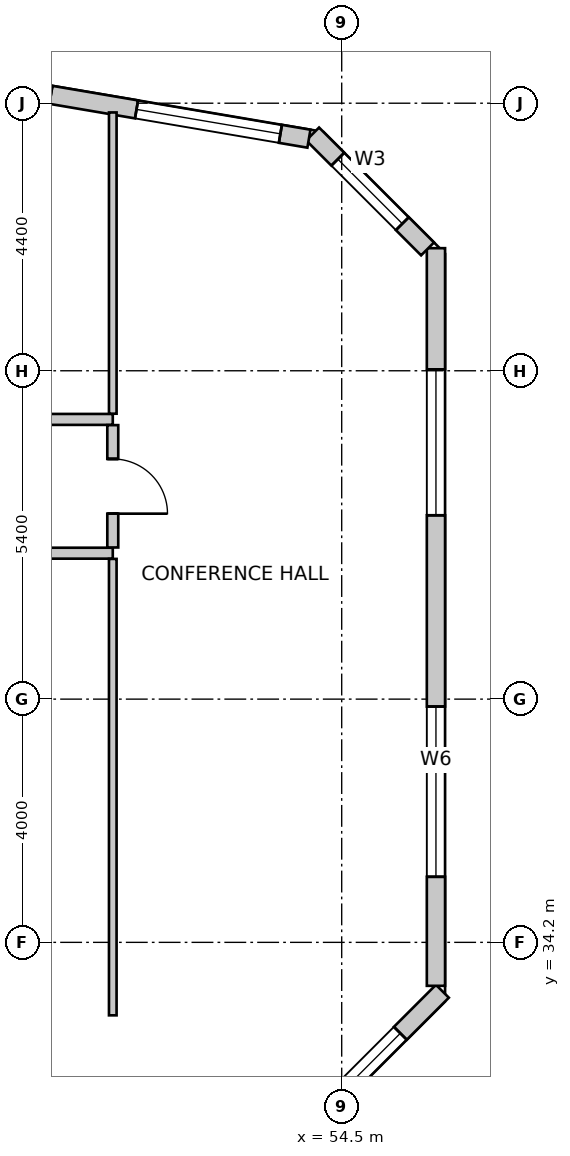
"""IFC4 building model, lengths in metres.
Left out: names, types, materials, properties, quantities, classifications, styles, units other than length and angle.
Written with IfcOpenShell. Run it as: python <this file> out.ifc"""

import sys

from ifc_helpers import new_model, si_unit, direction, frame, frame_2d, origin, place, context, subcontext, project, spatial, rectangle, extrude, source, transform, mapped, element, fill, save


model = new_model("IFC4")
c1 = context("Model", 3, precision=1e-05, world=origin(), true_north=direction((0.0, 1.0)))
c2 = subcontext(c1, "Body", "Model", "MODEL_VIEW")
j1 = project(units=[si_unit("LENGTHUNIT", "METRE"), si_unit("PLANEANGLEUNIT", "RADIAN")], contexts=[c1])
p1 = place(None, origin())
s1 = spatial("IfcSite", under=j1, at=p1, CompositionType="ELEMENT")
p2 = place(p1, origin())
s2 = spatial("IfcBuilding", under=s1, at=p2, CompositionType="ELEMENT")
p3 = place(p2, frame((0.0, 0.0, 67.0)))
s3 = spatial("IfcBuildingStorey", under=s2, at=p3, CompositionType="ELEMENT", Elevation=67.0)
p4 = place(p3, frame((53.076, 30.316, 0.0), z_axis=(0.0, 0.0, 1.0), x_axis=(0.707078757535, 0.707134803727, 0.0)))
e1 = element("IfcWall", 1, at=p4, inside=s3, PredefinedType="SOLIDWALL", context=c2, shape_type="SweptSolid", body=[
    extrude(rectangle(XDim=4.356, YDim=0.3, at=frame_2d((2.178, 0.0))), origin(), (0.0, 0.0, 1.0), 3.75),
])
m1 = source(origin(), c2, "Body", "SweptSolid", [
    extrude(rectangle(XDim=2.4, YDim=2.2, at=frame_2d((1.2, 1.1))), frame((0.0, 0.16, 0.0), z_axis=(0.0, -1.0, 0.0), x_axis=(1.0, 0.0, 0.0)), (0.0, 0.0, 1.0), 0.32),
])
p5 = place(p4, frame((0.978, 0.0, 0.85)))
e2 = element("IfcOpeningElement", 2, at=p5, cuts=e1, PredefinedType="OPENING", context=c2, shape_type="MappedRepresentation", body=[
    mapped(m1, transform((0.0, 0.0, 0.0), scale=1.0)),
])
p6 = place(p3, frame((56.05, 33.485, 0.0), z_axis=(0.0, 0.0, 1.0), x_axis=(0.0, 1.0, 0.0)))
e3 = element("IfcWall", 3, at=p6, inside=s3, PredefinedType="SOLIDWALL", context=c2, shape_type="SweptSolid", body=[
    extrude(rectangle(XDim=12.131, YDim=0.3, at=frame_2d((6.065, 0.0))), origin(), (0.0, 0.0, 1.0), 3.75),
])
m2 = source(origin(), c2, "Body", "SweptSolid", [
    extrude(rectangle(XDim=2.8, YDim=2.4, at=frame_2d((1.4, 1.2))), frame((0.0, 0.16, 0.0), z_axis=(0.0, -1.0, 0.0), x_axis=(1.0, 0.0, 0.0)), (0.0, 0.0, 1.0), 0.32),
])
p7 = place(p6, frame((1.793, 0.0, 0.85)))
e4 = element("IfcOpeningElement", 4, at=p7, cuts=e3, PredefinedType="OPENING", context=c2, shape_type="MappedRepresentation", body=[
    mapped(m2, transform((0.0, 0.0, 0.0), scale=1.0)),
])
p8 = place(p6, frame((7.738, 0.0, 0.85)))
e5 = element("IfcOpeningElement", 5, at=p8, cuts=e3, PredefinedType="OPENING", context=c2, shape_type="MappedRepresentation", body=[
    mapped(m1, transform((0.0, 0.0, 0.0), scale=1.0)),
])
p9 = place(p3, frame((55.912, 45.604, 0.0), z_axis=(0.0, 0.0, 1.0), x_axis=(-0.707152443695, 0.707061115729, 0.0)))
e6 = element("IfcWall", 6, at=p9, inside=s3, PredefinedType="SOLIDWALL", context=c2, shape_type="SweptSolid", body=[
    extrude(rectangle(XDim=2.673, YDim=0.3, at=frame_2d((1.337, 0.0))), origin(), (0.0, 0.0, 1.0), 3.75),
])
m3 = source(origin(), c2, "Body", "SweptSolid", [
    extrude(rectangle(XDim=1.5, YDim=1.8, at=frame_2d((0.75, 0.9))), frame((0.0, 0.16, 0.0), z_axis=(0.0, -1.0, 0.0), x_axis=(1.0, 0.0, 0.0)), (0.0, 0.0, 1.0), 0.32),
])
p10 = place(p9, frame((0.587, 0.0, 0.85)))
e7 = element("IfcOpeningElement", 7, at=p10, cuts=e6, PredefinedType="OPENING", context=c2, shape_type="MappedRepresentation", body=[
    mapped(m3, transform((0.0, 0.0, 0.0), scale=1.0)),
])
p11 = place(p3, frame((53.961, 47.417, 0.0), z_axis=(0.0, 0.0, 1.0), x_axis=(-0.985865713455, 0.167537443678, 0.0)))
e8 = element("IfcWall", 8, at=p11, inside=s3, PredefinedType="SOLIDWALL", context=c2, shape_type="SweptSolid", body=[
    extrude(rectangle(XDim=32.537, YDim=0.3, at=frame_2d((16.269, 0.0))), origin(), (0.0, 0.0, 1.0), 3.75),
])
p12 = place(p11, frame((0.476, 0.0, 0.85)))
e9 = element("IfcOpeningElement", 9, at=p12, cuts=e8, PredefinedType="OPENING", context=c2, shape_type="MappedRepresentation", body=[
    mapped(m1, transform((0.0, 0.0, 0.0), scale=1.0)),
])
p13 = place(p11, frame((4.304, 0.0, 0.85)))
e10 = element("IfcOpeningElement", 10, at=p13, cuts=e8, PredefinedType="OPENING", context=c2, shape_type="MappedRepresentation", body=[
    mapped(m2, transform((0.0, 0.0, 0.0), scale=1.0)),
])
p14 = place(p11, frame((8.968, 0.0, 0.85)))
e11 = element("IfcOpeningElement", 11, at=p14, cuts=e8, PredefinedType="OPENING", context=c2, shape_type="MappedRepresentation", body=[
    mapped(m1, transform((0.0, 0.0, 0.0), scale=1.0)),
])
p15 = place(p11, frame((14.034, 0.0, 0.85)))
e12 = element("IfcOpeningElement", 12, at=p15, cuts=e8, PredefinedType="OPENING", context=c2, shape_type="MappedRepresentation", body=[
    mapped(m2, transform((0.0, 0.0, 0.0), scale=1.0)),
])
p16 = place(p11, frame((19.422, 0.0, 0.85)))
e13 = element("IfcOpeningElement", 13, at=p16, cuts=e8, PredefinedType="OPENING", context=c2, shape_type="MappedRepresentation", body=[
    mapped(m1, transform((0.0, 0.0, 0.0), scale=1.0)),
])
p17 = place(p11, frame((24.895, 0.0, 0.85)))
e14 = element("IfcOpeningElement", 14, at=p17, cuts=e8, PredefinedType="OPENING", context=c2, shape_type="MappedRepresentation", body=[
    mapped(m2, transform((0.0, 0.0, 0.0), scale=1.0)),
])
p18 = place(p11, frame((29.395, 0.0, 0.85)))
e15 = element("IfcOpeningElement", 15, at=p18, cuts=e8, PredefinedType="OPENING", context=c2, shape_type="MappedRepresentation", body=[
    mapped(m2, transform((0.0, 0.0, 0.0), scale=1.0)),
])
p19 = place(p3, frame((50.735, 40.6, 0.0), z_axis=(0.0, 0.0, 1.0), x_axis=(-1.0, 0.0, 0.0)))
e16 = element("IfcWall", 16, at=p19, inside=s3, PredefinedType="PARTITIONING", context=c2, shape_type="SweptSolid", body=[
    extrude(rectangle(XDim=5.483, YDim=0.18, at=frame_2d((2.742, 0.0))), origin(), (0.0, 0.0, 1.0), 3.125),
])
m4 = source(origin(), c2, "Body", "SweptSolid", [
    extrude(rectangle(XDim=0.9, YDim=2.15, at=frame_2d((0.45, 1.075))), frame((0.0, 0.1, 0.0), z_axis=(0.0, -1.0, 0.0), x_axis=(1.0, 0.0, 0.0)), (0.0, 0.0, 1.0), 0.2),
])
p20 = place(p19, frame((4.181, 0.0, 0.0)))
e17 = element("IfcOpeningElement", 17, at=p20, cuts=e16, PredefinedType="OPENING", context=c2, shape_type="MappedRepresentation", body=[
    mapped(m4, transform((0.0, 0.0, 0.0), scale=1.0)),
])
p21 = place(p3, frame((41.662, 42.8, 0.0), z_axis=(0.0, 0.0, 1.0), x_axis=(1.0, 0.0, 0.0)))
e18 = element("IfcWall", 18, at=p21, inside=s3, PredefinedType="PARTITIONING", context=c2, shape_type="SweptSolid", body=[
    extrude(rectangle(XDim=9.073, YDim=0.18, at=frame_2d((4.537, 0.0))), origin(), (0.0, 0.0, 1.0), 3.125),
])
p22 = place(p21, frame((4.026, 0.0, 0.0)))
e19 = element("IfcOpeningElement", 19, at=p22, cuts=e18, PredefinedType="OPENING", context=c2, shape_type="MappedRepresentation", body=[
    mapped(m4, transform((0.0, 0.0, 0.0), scale=1.0)),
])
p23 = place(p3, frame((50.735, 42.706, 0.0), z_axis=(0.0, 0.0, 1.0), x_axis=(0.0, -1.0, 0.0)))
e20 = element("IfcWall", 20, at=p23, inside=s3, PredefinedType="PARTITIONING", context=c2, shape_type="SweptSolid", body=[
    extrude(rectangle(XDim=2.012, YDim=0.18, at=frame_2d((1.006, 0.0))), origin(), (0.0, 0.0, 1.0), 3.75),
])
p24 = place(p23, frame((0.556, 0.0, 0.0)))
e21 = element("IfcOpeningElement", 21, at=p24, cuts=e20, PredefinedType="OPENING", context=c2, shape_type="MappedRepresentation", body=[
    mapped(m4, transform((0.0, 0.0, 0.0), scale=1.0)),
])
p25 = place(p3, frame((50.735, 40.506, 0.0), z_axis=(0.0, 0.0, 1.0), x_axis=(0.0, -1.0, 0.0)))
e22 = element("IfcWall", 22, at=p25, inside=s3, PredefinedType="PARTITIONING", context=c2, shape_type="SweptSolid", body=[
    extrude(rectangle(XDim=7.506, YDim=0.125, at=frame_2d((3.753, 0.0))), origin(), (0.0, 0.0, 1.0), 3.75),
])
p26 = place(p3, frame((50.735, 47.848, 0.0), z_axis=(0.0, 0.0, 1.0), x_axis=(0.0, -1.0, 0.0)))
e23 = element("IfcWall", 23, at=p26, inside=s3, PredefinedType="PARTITIONING", context=c2, shape_type="SweptSolid", body=[
    extrude(rectangle(XDim=4.954, YDim=0.125, at=frame_2d((2.477, 0.0))), origin(), (0.0, 0.0, 1.0), 3.75),
])
m5 = source(origin(), c2, "Body", "SweptSolid", [
    extrude(rectangle(XDim=2.4, YDim=2.2, at=frame_2d((1.2, 1.1))), frame((0.0, -0.015, 0.0), z_axis=(0.0, -1.0, 0.0), x_axis=(1.0, 0.0, 0.0)), (0.0, 0.0, 1.0), 0.06),
])
p27 = place(p5, origin())
e24 = element("IfcWindow", 24, at=p27, inside=s3, PartitioningType="SINGLE_PANEL", PredefinedType="WINDOW", context=c2, shape_type="MappedRepresentation", body=[
    mapped(m5, transform((0.0, 0.0, 0.0), scale=1.0)),
])
fill(e2, e24)
m6 = source(origin(), c2, "Body", "SweptSolid", [
    extrude(rectangle(XDim=2.8, YDim=2.4, at=frame_2d((1.4, 1.2))), frame((0.0, -0.015, 0.0), z_axis=(0.0, -1.0, 0.0), x_axis=(1.0, 0.0, 0.0)), (0.0, 0.0, 1.0), 0.06),
])
p28 = place(p7, origin())
e25 = element("IfcWindow", 25, at=p28, inside=s3, PartitioningType="SINGLE_PANEL", PredefinedType="WINDOW", context=c2, shape_type="MappedRepresentation", body=[
    mapped(m6, transform((0.0, 0.0, 0.0), scale=1.0)),
])
fill(e4, e25)
p29 = place(p8, origin())
e26 = element("IfcWindow", 26, at=p29, inside=s3, PartitioningType="SINGLE_PANEL", PredefinedType="WINDOW", context=c2, shape_type="MappedRepresentation", body=[
    mapped(m5, transform((0.0, 0.0, 0.0), scale=1.0)),
])
fill(e5, e26)
m7 = source(origin(), c2, "Body", "SweptSolid", [
    extrude(rectangle(XDim=1.5, YDim=1.8, at=frame_2d((0.75, 0.9))), frame((0.0, -0.015, 0.0), z_axis=(0.0, -1.0, 0.0), x_axis=(1.0, 0.0, 0.0)), (0.0, 0.0, 1.0), 0.06),
])
p30 = place(p10, origin())
e27 = element("IfcWindow", 27, at=p30, inside=s3, PartitioningType="SINGLE_PANEL", PredefinedType="WINDOW", context=c2, shape_type="MappedRepresentation", body=[
    mapped(m7, transform((0.0, 0.0, 0.0), scale=1.0)),
])
fill(e7, e27)
p31 = place(p12, origin())
e28 = element("IfcWindow", 28, at=p31, inside=s3, PartitioningType="SINGLE_PANEL", PredefinedType="WINDOW", context=c2, shape_type="MappedRepresentation", body=[
    mapped(m5, transform((0.0, 0.0, 0.0), scale=1.0)),
])
fill(e9, e28)
m8 = source(origin(), c2, "Body", "SweptSolid", [
    extrude(rectangle(XDim=0.9, YDim=2.15, at=frame_2d((0.45, 1.075))), frame((0.0, 0.025, 0.0), z_axis=(0.0, -1.0, 0.0), x_axis=(1.0, 0.0, 0.0)), (0.0, 0.0, 1.0), 0.05),
])
p32 = place(p24, origin())
e29 = element("IfcDoor", 29, at=p32, inside=s3, OperationType="SINGLE_SWING_RIGHT", PredefinedType="DOOR", context=c2, shape_type="MappedRepresentation", body=[
    mapped(m8, transform((0.0, 0.0, 0.0), scale=1.0)),
])
fill(e21, e29)
save(model, sys.argv[1])
